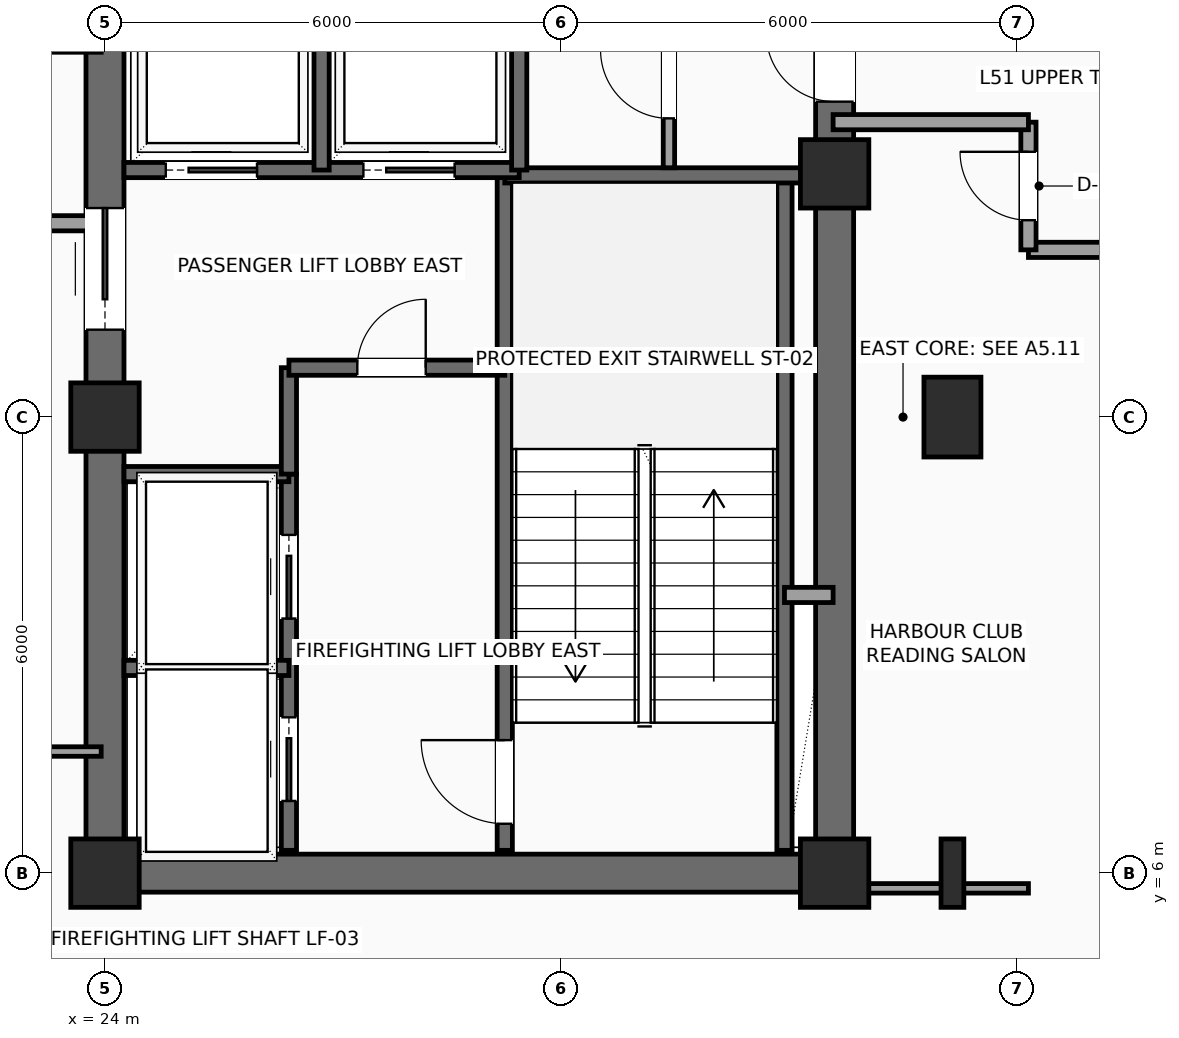
"""IFC4 building model, lengths in metres.
Left out: names, types, materials, properties, quantities, classifications, styles, units other than length and angle.
Written with IfcOpenShell. Run it as: python <this file> out.ifc"""

import sys

from ifc_helpers import new_model, si_unit, direction, frame, frame_2d, origin, origin_2d, place, context, subcontext, project, spatial, rectangle, i_section, extrude, element, fill, save


model = new_model("IFC4")
c1 = context("Model", 3, precision=1e-05, world=origin(), true_north=direction((0.0, 1.0)))
c2 = subcontext(c1, "Body", "Model", "MODEL_VIEW")
j1 = project(units=[si_unit("LENGTHUNIT", "METRE"), si_unit("PLANEANGLEUNIT", "RADIAN")], contexts=[c1])
p1 = place(None, origin())
s1 = spatial("IfcSite", under=j1, at=p1, CompositionType="ELEMENT")
p2 = place(p1, origin())
s2 = spatial("IfcBuilding", under=s1, at=p2, CompositionType="ELEMENT")
p3 = place(p2, frame((0.0, 0.0, 208.65)))
s3 = spatial("IfcBuildingStorey", under=s2, at=p3, CompositionType="ELEMENT", Elevation=208.65)
for number, where, z_axis, x_axis in (
    (1, (24.0, 6.0, 0.0), (0.0, 0.0, 1.0), (1.0, 0.0, 0.0)),
    (2, (24.0, 12.0, 0.0), (0.0, 0.0, 1.0), (1.0, 0.0, 0.0)),
    (3, (33.6, 6.0, 0.0), (0.0, 0.0, 1.0), (1.0, 0.0, 0.0)),
    (4, (33.6, 15.2, 0.0), (0.0, 0.0, 1.0), (1.0, 0.0, 0.0)),
):
    element("IfcColumn", number, at=place(p3, frame(where, z_axis=z_axis, x_axis=x_axis)), inside=s3, PredefinedType="COLUMN", context=c2, shape_type="SweptSolid", body=[
        extrude(rectangle(XDim=0.9, YDim=0.9, at=origin_2d()), origin(), (0.0, 0.0, 1.0), 3.75),
    ])
p4 = place(p3, frame((35.15, 6.0, 0.0), z_axis=(0.0, 0.0, 1.0), x_axis=(1.0, 0.0, 0.0)))
e5 = element("IfcColumn", 5, at=p4, inside=s3, PredefinedType="COLUMN", context=c2, shape_type="SweptSolid", body=[
    extrude(i_section(OverallWidth=0.3, OverallDepth=0.9, WebThickness=0.019, FlangeThickness=0.035, FilletRadius=0.03, at=origin_2d()), origin(), (0.0, 0.0, 1.0), 3.75),
])
p5 = place(p3, frame((35.15, 12.0, 0.0), z_axis=(0.0, 0.0, 1.0), x_axis=(1.0, 0.0, 0.0)))
e6 = element("IfcColumn", 6, at=p5, inside=s3, PredefinedType="COLUMN", context=c2, shape_type="SweptSolid", body=[
    extrude(rectangle(XDim=0.75, YDim=1.05, at=origin_2d()), origin(), (0.0, 0.0, 1.0), 3.75),
])
p6 = place(p3, frame((24.0, 6.0, 0.0), z_axis=(0.0, 0.0, 1.0), x_axis=(1.0, 0.0, 0.0)))
e7 = element("IfcWall", 7, at=p6, inside=s3, PredefinedType="SHEAR", context=c2, shape_type="SweptSolid", body=[
    extrude(rectangle(XDim=9.6, YDim=0.5, at=frame_2d((4.8, 0.0))), origin(), (0.0, 0.0, 1.0), 3.54),
])
p7 = place(p3, frame((24.0, 6.0, 0.0), z_axis=(0.0, 0.0, 1.0), x_axis=(0.0, 1.0, 0.0)))
e8 = element("IfcWall", 8, at=p7, inside=s3, PredefinedType="SHEAR", context=c2, shape_type="SweptSolid", body=[
    extrude(rectangle(XDim=12.0, YDim=0.5, at=frame_2d((6.0, 0.0))), origin(), (0.0, 0.0, 1.0), 3.54),
])
p8 = place(p7, frame((7.15, 0.0, 0.0)))
e9 = element("IfcOpeningElement", 9, at=p8, cuts=e8, PredefinedType="OPENING", context=c2, shape_type="SweptSolid", body=[
    extrude(rectangle(XDim=1.6, YDim=2.3, at=frame_2d((0.8, 1.15))), frame((0.0, 0.26, 0.0), z_axis=(0.0, -1.0, 0.0), x_axis=(1.0, 0.0, 0.0)), (0.0, 0.0, 1.0), 0.52),
])
p9 = place(p3, frame((33.6, 6.0, 0.0), z_axis=(0.0, 0.0, 1.0), x_axis=(0.0, 1.0, 0.0)))
e10 = element("IfcWall", 10, at=p9, inside=s3, PredefinedType="SHEAR", context=c2, shape_type="SweptSolid", body=[
    extrude(rectangle(XDim=12.0, YDim=0.5, at=frame_2d((6.0, 0.0))), origin(), (0.0, 0.0, 1.0), 3.54),
])
p10 = place(p9, frame((10.15, 0.0, 0.0)))
e11 = element("IfcOpeningElement", 11, at=p10, cuts=e10, PredefinedType="OPENING", context=c2, shape_type="SweptSolid", body=[
    extrude(rectangle(XDim=0.9, YDim=2.15, at=frame_2d((0.45, 1.075))), frame((0.0, 0.26, 0.0), z_axis=(0.0, -1.0, 0.0), x_axis=(1.0, 0.0, 0.0)), (0.0, 0.0, 1.0), 0.52),
])
p11 = place(p3, frame((29.26, 6.3, 0.0), z_axis=(0.0, 0.0, 1.0), x_axis=(0.0, 1.0, 0.0)))
e12 = element("IfcWall", 12, at=p11, inside=s3, PredefinedType="SHEAR", context=c2, shape_type="SweptSolid", body=[
    extrude(rectangle(XDim=8.88, YDim=0.2, at=frame_2d((4.44, 0.0))), origin(), (0.0, 0.0, 1.0), 3.54),
])
p12 = place(p11, frame((0.35, 0.0, 0.0)))
e13 = element("IfcOpeningElement", 13, at=p12, cuts=e12, PredefinedType="OPENING", context=c2, shape_type="SweptSolid", body=[
    extrude(rectangle(XDim=1.1, YDim=2.2, at=frame_2d((0.55, 1.1))), frame((0.0, 0.11, 0.0), z_axis=(0.0, -1.0, 0.0), x_axis=(1.0, 0.0, 0.0)), (0.0, 0.0, 1.0), 0.22),
])
p13 = place(p3, frame((32.94, 6.3, 0.0), z_axis=(0.0, 0.0, 1.0), x_axis=(0.0, 1.0, 0.0)))
e14 = element("IfcWall", 14, at=p13, inside=s3, PredefinedType="SHEAR", context=c2, shape_type="SweptSolid", body=[
    extrude(rectangle(XDim=8.88, YDim=0.2, at=frame_2d((4.44, 0.0))), origin(), (0.0, 0.0, 1.0), 3.54),
])
p14 = place(p3, frame((29.26, 15.18, 0.0), z_axis=(0.0, 0.0, 1.0), x_axis=(1.0, 0.0, 0.0)))
e15 = element("IfcWall", 15, at=p14, inside=s3, PredefinedType="SHEAR", context=c2, shape_type="SweptSolid", body=[
    extrude(rectangle(XDim=4.04, YDim=0.2, at=frame_2d((2.02, 0.0))), origin(), (0.0, 0.0, 1.0), 3.54),
])
p15 = place(p3, frame((26.42, 6.3, 0.0), z_axis=(0.0, 0.0, 1.0), x_axis=(0.0, 1.0, 0.0)))
e16 = element("IfcWall", 16, at=p15, inside=s3, PredefinedType="SHEAR", context=c2, shape_type="SweptSolid", body=[
    extrude(rectangle(XDim=4.95, YDim=0.2, at=frame_2d((2.475, 0.0))), origin(), (0.0, 0.0, 1.0), 3.54),
])
p16 = place(p15, frame((0.65, 0.0, 0.0)))
e17 = element("IfcOpeningElement", 17, at=p16, cuts=e16, PredefinedType="OPENING", context=c2, shape_type="SweptSolid", body=[
    extrude(rectangle(XDim=1.1, YDim=2.2, at=frame_2d((0.55, 1.1))), frame((0.0, 0.11, 0.0), z_axis=(0.0, -1.0, 0.0), x_axis=(1.0, 0.0, 0.0)), (0.0, 0.0, 1.0), 0.22),
])
p17 = place(p15, frame((3.05, 0.0, 0.0)))
e18 = element("IfcOpeningElement", 18, at=p17, cuts=e16, PredefinedType="OPENING", context=c2, shape_type="SweptSolid", body=[
    extrude(rectangle(XDim=1.1, YDim=2.2, at=frame_2d((0.55, 1.1))), frame((0.0, 0.11, 0.0), z_axis=(0.0, -1.0, 0.0), x_axis=(1.0, 0.0, 0.0)), (0.0, 0.0, 1.0), 0.22),
])
for number, where, z_axis, x_axis in (
    (19, (24.25, 8.7, 0.0), (0.0, 0.0, 1.0), (1.0, 0.0, 0.0)),
    (20, (24.25, 11.25, 0.0), (0.0, 0.0, 1.0), (1.0, 0.0, 0.0)),
):
    element("IfcWall", number, at=place(p3, frame(where, z_axis=z_axis, x_axis=x_axis)), inside=s3, PredefinedType="SHEAR", context=c2, shape_type="SweptSolid", body=[
        extrude(rectangle(XDim=2.17, YDim=0.2, at=frame_2d((1.085, 0.0))), origin(), (0.0, 0.0, 1.0), 3.54),
    ])
p18 = place(p3, frame((26.42, 11.25, 0.0), z_axis=(0.0, 0.0, 1.0), x_axis=(0.0, 1.0, 0.0)))
e21 = element("IfcWall", 21, at=p18, inside=s3, PredefinedType="SHEAR", context=c2, shape_type="SweptSolid", body=[
    extrude(rectangle(XDim=1.4, YDim=0.2, at=frame_2d((0.7, 0.0))), origin(), (0.0, 0.0, 1.0), 3.54),
])
p19 = place(p3, frame((26.42, 12.65, 0.0), z_axis=(0.0, 0.0, 1.0), x_axis=(1.0, 0.0, 0.0)))
e22 = element("IfcWall", 22, at=p19, inside=s3, PredefinedType="SHEAR", context=c2, shape_type="SweptSolid", body=[
    extrude(rectangle(XDim=2.84, YDim=0.2, at=frame_2d((1.42, 0.0))), origin(), (0.0, 0.0, 1.0), 3.54),
])
p20 = place(p19, frame((0.9, 0.0, 0.0)))
e23 = element("IfcOpeningElement", 23, at=p20, cuts=e22, PredefinedType="OPENING", context=c2, shape_type="SweptSolid", body=[
    extrude(rectangle(XDim=0.9, YDim=2.15, at=frame_2d((0.45, 1.075))), frame((0.0, 0.11, 0.0), z_axis=(0.0, -1.0, 0.0), x_axis=(1.0, 0.0, 0.0)), (0.0, 0.0, 1.0), 0.22),
])
p21 = place(p3, frame((32.94, 9.66, 0.0), z_axis=(0.0, 0.0, 1.0), x_axis=(1.0, 0.0, 0.0)))
e24 = element("IfcWall", 24, at=p21, inside=s3, PredefinedType="SOLIDWALL", context=c2, shape_type="SweptSolid", body=[
    extrude(rectangle(XDim=0.64, YDim=0.2, at=frame_2d((0.32, 0.0))), origin(), (0.0, 0.0, 1.0), 3.54),
])
p22 = place(p3, frame((24.25, 15.25, 0.0), z_axis=(0.0, 0.0, 1.0), x_axis=(1.0, 0.0, 0.0)))
e25 = element("IfcWall", 25, at=p22, inside=s3, PredefinedType="SHEAR", context=c2, shape_type="SweptSolid", body=[
    extrude(rectangle(XDim=5.2, YDim=0.2, at=frame_2d((2.6, 0.0))), origin(), (0.0, 0.0, 1.0), 3.54),
])
p23 = place(p22, frame((0.55, 0.0, 0.0)))
e26 = element("IfcOpeningElement", 26, at=p23, cuts=e25, PredefinedType="OPENING", context=c2, shape_type="SweptSolid", body=[
    extrude(rectangle(XDim=1.2, YDim=2.2, at=frame_2d((0.6, 1.1))), frame((0.0, 0.11, 0.0), z_axis=(0.0, -1.0, 0.0), x_axis=(1.0, 0.0, 0.0)), (0.0, 0.0, 1.0), 0.22),
])
p24 = place(p22, frame((3.15, 0.0, 0.0)))
e27 = element("IfcOpeningElement", 27, at=p24, cuts=e25, PredefinedType="OPENING", context=c2, shape_type="SweptSolid", body=[
    extrude(rectangle(XDim=1.2, YDim=2.2, at=frame_2d((0.6, 1.1))), frame((0.0, 0.11, 0.0), z_axis=(0.0, -1.0, 0.0), x_axis=(1.0, 0.0, 0.0)), (0.0, 0.0, 1.0), 0.22),
])
p25 = place(p3, frame((26.85, 15.25, 0.0), z_axis=(0.0, 0.0, 1.0), x_axis=(0.0, 1.0, 0.0)))
e28 = element("IfcWall", 28, at=p25, inside=s3, PredefinedType="SHEAR", context=c2, shape_type="SweptSolid", body=[
    extrude(rectangle(XDim=2.4, YDim=0.2, at=frame_2d((1.2, 0.0))), origin(), (0.0, 0.0, 1.0), 3.54),
])
p26 = place(p3, frame((29.45, 15.25, 0.0), z_axis=(0.0, 0.0, 1.0), x_axis=(0.0, 1.0, 0.0)))
e29 = element("IfcWall", 29, at=p26, inside=s3, PredefinedType="SHEAR", context=c2, shape_type="SweptSolid", body=[
    extrude(rectangle(XDim=2.45, YDim=0.2, at=frame_2d((1.225, 0.0))), origin(), (0.0, 0.0, 1.0), 3.54),
])
p27 = place(p3, frame((31.42, 15.28, 0.0), z_axis=(0.0, 0.0, 1.0), x_axis=(0.0, 1.0, 0.0)))
e30 = element("IfcWall", 30, at=p27, inside=s3, PredefinedType="PARTITIONING", context=c2, shape_type="SweptSolid", body=[
    extrude(rectangle(XDim=2.42, YDim=0.15, at=frame_2d((1.21, 0.0))), origin(), (0.0, 0.0, 1.0), 3.54),
])
p28 = place(p27, frame((0.65, 0.0, 0.0)))
e31 = element("IfcOpeningElement", 31, at=p28, cuts=e30, PredefinedType="OPENING", context=c2, shape_type="SweptSolid", body=[
    extrude(rectangle(XDim=0.9, YDim=2.15, at=frame_2d((0.45, 1.075))), frame((0.0, 0.085, 0.0), z_axis=(0.0, -1.0, 0.0), x_axis=(1.0, 0.0, 0.0)), (0.0, 0.0, 1.0), 0.17),
])
p29 = place(p3, frame((38.55, 14.2, 0.0), z_axis=(0.0, 0.0, 1.0), x_axis=(-1.0, 0.0, 0.0)))
e32 = element("IfcWall", 32, at=p29, inside=s3, PredefinedType="PARTITIONING", context=c2, shape_type="SweptSolid", body=[
    extrude(rectangle(XDim=2.4, YDim=0.2, at=frame_2d((1.2, 0.0))), origin(), (0.0, 0.0, 1.0), 3.54),
])
p30 = place(p3, frame((36.15, 14.2, 0.0), z_axis=(0.0, 0.0, 1.0), x_axis=(0.0, 1.0, 0.0)))
e33 = element("IfcWall", 33, at=p30, inside=s3, PredefinedType="PARTITIONING", context=c2, shape_type="SweptSolid", body=[
    extrude(rectangle(XDim=1.68, YDim=0.2, at=frame_2d((0.84, 0.0))), origin(), (0.0, 0.0, 1.0), 3.54),
])
p31 = place(p30, frame((0.39, 0.0, 0.0)))
e34 = element("IfcOpeningElement", 34, at=p31, cuts=e33, PredefinedType="OPENING", context=c2, shape_type="SweptSolid", body=[
    extrude(rectangle(XDim=0.9, YDim=2.1, at=frame_2d((0.45, 1.05))), frame((0.0, 0.11, 0.0), z_axis=(0.0, -1.0, 0.0), x_axis=(1.0, 0.0, 0.0)), (0.0, 0.0, 1.0), 0.22),
])
p32 = place(p3, frame((36.15, 15.88, 0.0), z_axis=(0.0, 0.0, 1.0), x_axis=(-1.0, 0.0, 0.0)))
e35 = element("IfcWall", 35, at=p32, inside=s3, PredefinedType="PARTITIONING", context=c2, shape_type="SweptSolid", body=[
    extrude(rectangle(XDim=2.57, YDim=0.2, at=frame_2d((1.285, 0.0))), origin(), (0.0, 0.0, 1.0), 3.54),
])
p33 = place(p3, frame((20.45, 16.9, 0.0), z_axis=(0.0, 0.0, 1.0), x_axis=(1.0, 0.0, 0.0)))
e36 = element("IfcWall", 36, at=p33, inside=s3, PredefinedType="PARTITIONING", context=c2, shape_type="SweptSolid", body=[
    extrude(rectangle(XDim=3.5, YDim=0.2, at=frame_2d((1.75, 0.0))), origin(), (0.0, 0.0, 1.0), 3.54),
])
p34 = place(p3, frame((23.95, 14.55, 0.0), z_axis=(0.0, 0.0, 1.0), x_axis=(-1.0, 0.0, 0.0)))
e37 = element("IfcWall", 37, at=p34, inside=s3, PredefinedType="PARTITIONING", context=c2, shape_type="SweptSolid", body=[
    extrude(rectangle(XDim=9.0, YDim=0.2, at=frame_2d((4.5, 0.0))), origin(), (0.0, 0.0, 1.0), 3.54),
])
p35 = place(p34, frame((2.815, 0.0, 0.0)))
e38 = element("IfcOpeningElement", 38, at=p35, cuts=e37, PredefinedType="OPENING", context=c2, shape_type="SweptSolid", body=[
    extrude(rectangle(XDim=1.0, YDim=2.2, at=frame_2d((0.5, 1.1))), frame((0.0, 0.11, 0.0), z_axis=(0.0, -1.0, 0.0), x_axis=(1.0, 0.0, 0.0)), (0.0, 0.0, 1.0), 0.22),
])
p36 = place(p3, frame((33.65, 5.8, 0.0), z_axis=(0.0, 0.0, 1.0), x_axis=(1.0, 0.0, 0.0)))
e39 = element("IfcWall", 39, at=p36, inside=s3, PredefinedType="PARTITIONING", context=c2, shape_type="SweptSolid", body=[
    extrude(rectangle(XDim=2.5, YDim=0.125, at=frame_2d((1.25, 0.0))), origin(), (0.0, 0.0, 1.0), 3.132),
])
p37 = place(p3, frame((14.95, 7.6, 0.0), z_axis=(0.0, 0.0, 1.0), x_axis=(1.0, 0.0, 0.0)))
e40 = element("IfcWall", 40, at=p37, inside=s3, PredefinedType="PARTITIONING", context=c2, shape_type="SweptSolid", body=[
    extrude(rectangle(XDim=9.0, YDim=0.125, at=frame_2d((4.5, 0.0))), origin(), (0.0, 0.0, 1.0), 3.54),
])
p38 = place(p8, origin())
e41 = element("IfcDoor", 41, at=p38, inside=s3, OperationType="DOUBLE_DOOR_SLIDING", PredefinedType="DOOR", context=c2, shape_type="SweptSolid", body=[
    extrude(rectangle(XDim=1.6, YDim=2.3, at=frame_2d((0.8, 1.15))), frame((0.0, 0.025, 0.0), z_axis=(0.0, -1.0, 0.0), x_axis=(1.0, 0.0, 0.0)), (0.0, 0.0, 1.0), 0.05),
])
fill(e9, e41)
p39 = place(p10, origin())
e42 = element("IfcDoor", 42, at=p39, inside=s3, OperationType="SINGLE_SWING_RIGHT", PredefinedType="DOOR", context=c2, shape_type="SweptSolid", body=[
    extrude(rectangle(XDim=0.9, YDim=2.15, at=frame_2d((0.45, 1.075))), frame((0.0, 0.025, 0.0), z_axis=(0.0, -1.0, 0.0), x_axis=(1.0, 0.0, 0.0)), (0.0, 0.0, 1.0), 0.05),
])
fill(e11, e42)
p40 = place(p12, origin())
e43 = element("IfcDoor", 43, at=p40, inside=s3, OperationType="SINGLE_SWING_RIGHT", PredefinedType="DOOR", context=c2, shape_type="SweptSolid", body=[
    extrude(rectangle(XDim=1.1, YDim=2.2, at=frame_2d((0.55, 1.1))), frame((0.0, 0.025, 0.0), z_axis=(0.0, -1.0, 0.0), x_axis=(1.0, 0.0, 0.0)), (0.0, 0.0, 1.0), 0.05),
])
fill(e13, e43)
p41 = place(p16, origin())
e44 = element("IfcDoor", 44, at=p41, inside=s3, OperationType="SLIDING_TO_LEFT", PredefinedType="DOOR", context=c2, shape_type="SweptSolid", body=[
    extrude(rectangle(XDim=1.1, YDim=2.2, at=frame_2d((0.55, 1.1))), frame((0.0, 0.025, 0.0), z_axis=(0.0, -1.0, 0.0), x_axis=(1.0, 0.0, 0.0)), (0.0, 0.0, 1.0), 0.05),
])
fill(e17, e44)
p42 = place(p17, origin())
e45 = element("IfcDoor", 45, at=p42, inside=s3, OperationType="SLIDING_TO_LEFT", PredefinedType="DOOR", context=c2, shape_type="SweptSolid", body=[
    extrude(rectangle(XDim=1.1, YDim=2.2, at=frame_2d((0.55, 1.1))), frame((0.0, 0.025, 0.0), z_axis=(0.0, -1.0, 0.0), x_axis=(1.0, 0.0, 0.0)), (0.0, 0.0, 1.0), 0.05),
])
fill(e18, e45)
p43 = place(p20, origin())
e46 = element("IfcDoor", 46, at=p43, inside=s3, OperationType="SINGLE_SWING_RIGHT", PredefinedType="DOOR", context=c2, shape_type="SweptSolid", body=[
    extrude(rectangle(XDim=0.9, YDim=2.15, at=frame_2d((0.45, 1.075))), frame((0.0, 0.025, 0.0), z_axis=(0.0, -1.0, 0.0), x_axis=(1.0, 0.0, 0.0)), (0.0, 0.0, 1.0), 0.05),
])
fill(e23, e46)
p44 = place(p23, origin())
e47 = element("IfcDoor", 47, at=p44, inside=s3, OperationType="SLIDING_TO_RIGHT", PredefinedType="DOOR", context=c2, shape_type="SweptSolid", body=[
    extrude(rectangle(XDim=1.2, YDim=2.2, at=frame_2d((0.6, 1.1))), frame((0.0, 0.025, 0.0), z_axis=(0.0, -1.0, 0.0), x_axis=(1.0, 0.0, 0.0)), (0.0, 0.0, 1.0), 0.05),
])
fill(e26, e47)
p45 = place(p24, origin())
e48 = element("IfcDoor", 48, at=p45, inside=s3, OperationType="SLIDING_TO_RIGHT", PredefinedType="DOOR", context=c2, shape_type="SweptSolid", body=[
    extrude(rectangle(XDim=1.2, YDim=2.2, at=frame_2d((0.6, 1.1))), frame((0.0, 0.025, 0.0), z_axis=(0.0, -1.0, 0.0), x_axis=(1.0, 0.0, 0.0)), (0.0, 0.0, 1.0), 0.05),
])
fill(e27, e48)
p46 = place(p28, origin())
e49 = element("IfcDoor", 49, at=p46, inside=s3, OperationType="SINGLE_SWING_RIGHT", PredefinedType="DOOR", context=c2, shape_type="SweptSolid", body=[
    extrude(rectangle(XDim=0.9, YDim=2.15, at=frame_2d((0.45, 1.075))), frame((0.0, 0.025, 0.0), z_axis=(0.0, -1.0, 0.0), x_axis=(1.0, 0.0, 0.0)), (0.0, 0.0, 1.0), 0.05),
])
fill(e31, e49)
p47 = place(p31, origin())
e50 = element("IfcDoor", 50, at=p47, inside=s3, OperationType="SINGLE_SWING_RIGHT", PredefinedType="DOOR", context=c2, shape_type="SweptSolid", body=[
    extrude(rectangle(XDim=0.9, YDim=2.1, at=frame_2d((0.45, 1.05))), frame((0.0, 0.025, 0.0), z_axis=(0.0, -1.0, 0.0), x_axis=(1.0, 0.0, 0.0)), (0.0, 0.0, 1.0), 0.05),
])
fill(e34, e50)
save(model, sys.argv[1])
